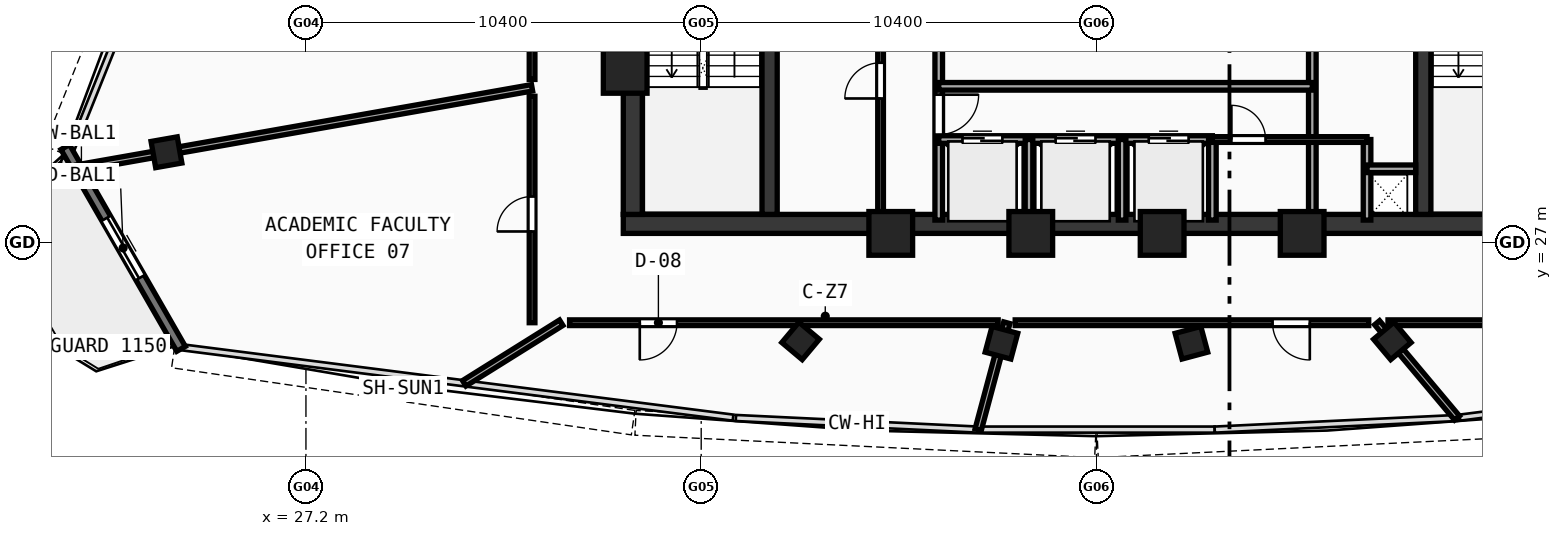
"""IFC4 building model, lengths in metres.
Left out: names, types, materials, properties, quantities, classifications, styles, units other than length and angle.
Written with IfcOpenShell. Run it as: python <this file> out.ifc"""

import sys

from ifc_helpers import new_model, si_unit, direction, frame, frame_2d, origin, origin_with_axes, origin_2d, place, context, subcontext, project, spatial, rectangle, hollow_rectangle, extrude, source, transform, mapped, element, fill, save


model = new_model("IFC4")
c1 = context("Model", 3, precision=1e-05, world=origin(), true_north=direction((0.0, 1.0)))
c2 = subcontext(c1, "Body", "Model", "MODEL_VIEW")
j1 = project(units=[si_unit("LENGTHUNIT", "METRE"), si_unit("PLANEANGLEUNIT", "RADIAN")], contexts=[c1])
p1 = place(None, origin())
s1 = spatial("IfcSite", under=j1, at=p1, CompositionType="ELEMENT")
p2 = place(p1, origin())
s2 = spatial("IfcBuilding", under=s1, at=p2, CompositionType="ELEMENT")
p3 = place(p2, frame((0.0, 0.0, 348.01)))
s3 = spatial("IfcBuildingStorey", under=s2, at=p3, CompositionType="ELEMENT", Elevation=348.01)
p4 = place(p3, frame((35.55, 27.5, 0.0), z_axis=(0.0, 0.0, 1.0), x_axis=(1.0, 0.0, 0.0)))
e1 = element("IfcWall", 1, at=p4, inside=s3, PredefinedType="SHEAR", context=c2, shape_type="SweptSolid", body=[
    extrude(rectangle(XDim=24.9, YDim=0.5, at=frame_2d((12.45, 0.0))), origin(), (0.0, 0.0, 1.0), 3.49),
])
p5 = place(p3, frame((35.8, 27.75, 0.0), z_axis=(0.0, 0.0, 1.0), x_axis=(0.0, 1.0, 0.0)))
e2 = element("IfcWall", 2, at=p5, inside=s3, PredefinedType="SHEAR", context=c2, shape_type="SweptSolid", body=[
    extrude(rectangle(XDim=12.2, YDim=0.5, at=frame_2d((6.1, 0.0))), origin(), (0.0, 0.0, 1.0), 3.49),
])
p6 = place(p3, frame((39.4, 27.75, 0.0), z_axis=(0.0, 0.0, 1.0), x_axis=(0.0, 1.0, 0.0)))
e3 = element("IfcWall", 3, at=p6, inside=s3, PredefinedType="SHEAR", context=c2, shape_type="SweptSolid", body=[
    extrude(rectangle(XDim=12.2, YDim=0.4, at=frame_2d((6.1, 0.0))), origin(), (0.0, 0.0, 1.0), 3.49),
])
p7 = place(p6, frame((10.0, 0.0, 0.0)))
e4 = element("IfcOpeningElement", 4, at=p7, cuts=e3, PredefinedType="OPENING", context=c2, shape_type="SweptSolid", body=[
    extrude(rectangle(XDim=1.1, YDim=2.1, at=frame_2d((0.55, 1.05))), frame((0.0, 0.21, 0.0), z_axis=(0.0, -1.0, 0.0), x_axis=(1.0, 0.0, 0.0)), (0.0, 0.0, 1.0), 0.42),
])
p8 = place(p3, frame((56.6, 27.75, 0.0), z_axis=(0.0, 0.0, 1.0), x_axis=(0.0, 1.0, 0.0)))
e5 = element("IfcWall", 5, at=p8, inside=s3, PredefinedType="SHEAR", context=c2, shape_type="SweptSolid", body=[
    extrude(rectangle(XDim=12.2, YDim=0.4, at=frame_2d((6.1, 0.0))), origin(), (0.0, 0.0, 1.0), 3.49),
])
p9 = place(p8, frame((10.0, 0.0, 0.0)))
e6 = element("IfcOpeningElement", 6, at=p9, cuts=e5, PredefinedType="OPENING", context=c2, shape_type="SweptSolid", body=[
    extrude(rectangle(XDim=1.1, YDim=2.1, at=frame_2d((0.55, 1.05))), frame((0.0, 0.21, 0.0), z_axis=(0.0, -1.0, 0.0), x_axis=(1.0, 0.0, 0.0)), (0.0, 0.0, 1.0), 0.42),
])
m1 = source(origin(), c2, "Body", "SweptSolid", [
    extrude(hollow_rectangle(XDim=1.15, YDim=1.15, WallThickness=0.048, at=origin_2d()), origin(), (0.0, 0.0, 1.0), 3.75),
])
for number, where, z_axis, x_axis in (
    (7, (42.588, 27.25, -0.26), (0.0, 0.0, 1.0), (1.0, 0.0, 0.0)),
    (8, (46.272, 27.25, -0.26), (0.0, 0.0, 1.0), (1.0, 0.0, 0.0)),
    (9, (49.729, 27.25, -0.26), (0.0, 0.0, 1.0), (1.0, 0.0, 0.0)),
    (10, (53.412, 27.25, -0.26), (0.0, 0.0, 1.0), (1.0, 0.0, 0.0)),
    (11, (35.6, 31.513, -0.26), (0.0, 0.0, 1.0), (1.0, 0.0, 0.0)),
):
    element("IfcColumn", number, at=place(p3, frame(where, z_axis=z_axis, x_axis=x_axis)), inside=s3, PredefinedType="COLUMN", context=c2, shape_type="MappedRepresentation", body=[
        mapped(m1, transform((0.0, 0.0, 0.0), scale=1.0)),
    ])
m2 = source(origin(), c2, "Body", "SweptSolid", [
    extrude(hollow_rectangle(XDim=0.7, YDim=0.7, WallThickness=0.026, at=origin_2d()), origin(), (0.0, 0.0, 1.0), 3.75),
])
for number, where, z_axis, x_axis in (
    (12, (40.215, 24.422, -0.26), (0.0, 0.0, 1.0), (0.766, -0.643, 0.0)),
    (13, (45.501, 24.373, -0.26), (0.0, 0.0, 1.0), (0.966, -0.259, 0.0)),
    (14, (50.499, 24.373, -0.26), (0.0, 0.0, 1.0), (0.966, 0.259, 0.0)),
    (15, (55.785, 24.422, -0.26), (0.0, 0.0, 1.0), (0.766, 0.643, 0.0)),
    (16, (23.53, 29.385, -0.26), (0.0, 0.0, 1.0), (0.174, -0.985, 0.0)),
):
    element("IfcColumn", number, at=place(p3, frame(where, z_axis=z_axis, x_axis=x_axis)), inside=s3, PredefinedType="COLUMN", context=c2, shape_type="MappedRepresentation", body=[
        mapped(m2, transform((0.0, 0.0, 0.0), scale=1.0)),
    ])
p10 = place(p3, frame((20.865, 29.521, 0.0), z_axis=(0.0, 0.0, 1.0), x_axis=(0.49795859982, -0.867200803082, 0.0)))
e17 = element("IfcWall", 17, at=p10, inside=s3, PredefinedType="STANDARD", context=c2, shape_type="SweptSolid", body=[
    extrude(rectangle(XDim=6.123, YDim=0.26, at=frame_2d((3.061, 0.0))), origin(), (0.0, 0.0, 1.0), 3.49),
])
p11 = place(p10, frame((2.161, 0.0, 0.0)))
e18 = element("IfcOpeningElement", 18, at=p11, cuts=e17, PredefinedType="OPENING", context=c2, shape_type="SweptSolid", body=[
    extrude(rectangle(XDim=1.8, YDim=2.15, at=frame_2d((0.9, 1.075))), frame((0.0, 0.14, 0.0), z_axis=(0.0, -1.0, 0.0), x_axis=(1.0, 0.0, 0.0)), (0.0, 0.0, 1.0), 0.28),
])
p12 = place(p3, frame((43.85, 27.6, 0.0), z_axis=(0.0, 0.0, 1.0), x_axis=(0.0, 1.0, 0.0)))
e19 = element("IfcWall", 19, at=p12, inside=s3, PredefinedType="SOLIDWALL", context=c2, shape_type="SweptSolid", body=[
    extrude(rectangle(XDim=6.22, YDim=0.2, at=frame_2d((3.11, 0.0))), origin(), (0.0, 0.0, 1.0), 3.49),
])
p13 = place(p12, frame((2.25, 0.0, 0.0)))
e20 = element("IfcOpeningElement", 20, at=p13, cuts=e19, PredefinedType="OPENING", context=c2, shape_type="SweptSolid", body=[
    extrude(rectangle(XDim=1.05, YDim=2.1, at=frame_2d((0.525, 1.05))), frame((0.0, 0.11, 0.0), z_axis=(0.0, -1.0, 0.0), x_axis=(1.0, 0.0, 0.0)), (0.0, 0.0, 1.0), 0.22),
])
p14 = place(p3, frame((53.68, 27.6, 0.0), z_axis=(0.0, 0.0, 1.0), x_axis=(0.0, 1.0, 0.0)))
e21 = element("IfcWall", 21, at=p14, inside=s3, PredefinedType="SOLIDWALL", context=c2, shape_type="SweptSolid", body=[
    extrude(rectangle(XDim=9.05, YDim=0.2, at=frame_2d((4.525, 0.0))), origin(), (0.0, 0.0, 1.0), 3.49),
])
p15 = place(p14, frame((6.9, 0.0, 0.0)))
e22 = element("IfcOpeningElement", 22, at=p15, cuts=e21, PredefinedType="OPENING", context=c2, shape_type="SweptSolid", body=[
    extrude(rectangle(XDim=1.05, YDim=2.1, at=frame_2d((0.525, 1.05))), frame((0.0, 0.11, 0.0), z_axis=(0.0, -1.0, 0.0), x_axis=(1.0, 0.0, 0.0)), (0.0, 0.0, 1.0), 0.22),
])
p16 = place(p3, frame((43.85, 29.72, 0.0), z_axis=(0.0, 0.0, 1.0), x_axis=(1.0, 0.0, 0.0)))
e23 = element("IfcWall", 23, at=p16, inside=s3, PredefinedType="SOLIDWALL", context=c2, shape_type="SweptSolid", body=[
    extrude(rectangle(XDim=7.2, YDim=0.2, at=frame_2d((3.6, 0.0))), origin(), (0.0, 0.0, 1.0), 3.49),
])
p17 = place(p16, frame((0.625, 0.0, 0.0)))
e24 = element("IfcOpeningElement", 24, at=p17, cuts=e23, PredefinedType="OPENING", context=c2, shape_type="SweptSolid", body=[
    extrude(rectangle(XDim=1.05, YDim=2.1, at=frame_2d((0.525, 1.05))), frame((0.0, 0.11, 0.0), z_axis=(0.0, -1.0, 0.0), x_axis=(1.0, 0.0, 0.0)), (0.0, 0.0, 1.0), 0.22),
])
p18 = place(p16, frame((3.075, 0.0, 0.0)))
e25 = element("IfcOpeningElement", 25, at=p18, cuts=e23, PredefinedType="OPENING", context=c2, shape_type="SweptSolid", body=[
    extrude(rectangle(XDim=1.05, YDim=2.1, at=frame_2d((0.525, 1.05))), frame((0.0, 0.11, 0.0), z_axis=(0.0, -1.0, 0.0), x_axis=(1.0, 0.0, 0.0)), (0.0, 0.0, 1.0), 0.22),
])
p19 = place(p16, frame((5.525, 0.0, 0.0)))
e26 = element("IfcOpeningElement", 26, at=p19, cuts=e23, PredefinedType="OPENING", context=c2, shape_type="SweptSolid", body=[
    extrude(rectangle(XDim=1.05, YDim=2.1, at=frame_2d((0.525, 1.05))), frame((0.0, 0.11, 0.0), z_axis=(0.0, -1.0, 0.0), x_axis=(1.0, 0.0, 0.0)), (0.0, 0.0, 1.0), 0.22),
])
p20 = place(p3, frame((51.05, 27.6, 0.0), z_axis=(0.0, 0.0, 1.0), x_axis=(0.0, 1.0, 0.0)))
e27 = element("IfcWall", 27, at=p20, inside=s3, PredefinedType="SOLIDWALL", context=c2, shape_type="SweptSolid", body=[
    extrude(rectangle(XDim=2.12, YDim=0.2, at=frame_2d((1.06, 0.0))), origin(), (0.0, 0.0, 1.0), 3.49),
])
p21 = place(p3, frame((43.85, 31.12, 0.0), z_axis=(0.0, 0.0, 1.0), x_axis=(1.0, 0.0, 0.0)))
e28 = element("IfcWall", 28, at=p21, inside=s3, PredefinedType="SOLIDWALL", context=c2, shape_type="SweptSolid", body=[
    extrude(rectangle(XDim=9.83, YDim=0.2, at=frame_2d((4.915, 0.0))), origin(), (0.0, 0.0, 1.0), 3.49),
])
for number, where, z_axis, x_axis in (
    (29, (46.225, 27.6, 0.0), (0.0, 0.0, 1.0), (0.0, 1.0, 0.0)),
    (30, (48.675, 27.6, 0.0), (0.0, 0.0, 1.0), (0.0, 1.0, 0.0)),
    (31, (55.12, 27.6, 0.0), (0.0, 0.0, 1.0), (0.0, 1.0, 0.0)),
):
    element("IfcWall", number, at=place(p3, frame(where, z_axis=z_axis, x_axis=x_axis)), inside=s3, PredefinedType="SOLIDWALL", context=c2, shape_type="SweptSolid", body=[
        extrude(rectangle(XDim=2.12, YDim=0.2, at=frame_2d((1.06, 0.0))), origin(), (0.0, 0.0, 1.0), 3.49),
    ])
p22 = place(p3, frame((55.12, 28.95, 0.0), z_axis=(0.0, 0.0, 1.0), x_axis=(1.0, 0.0, 0.0)))
e32 = element("IfcWall", 32, at=p22, inside=s3, PredefinedType="SOLIDWALL", context=c2, shape_type="SweptSolid", body=[
    extrude(rectangle(XDim=1.28, YDim=0.2, at=frame_2d((0.64, 0.0))), origin(), (0.0, 0.0, 1.0), 3.49),
])
p23 = place(p3, frame((42.32, 27.6, 0.0), z_axis=(0.0, 0.0, 1.0), x_axis=(0.0, 1.0, 0.0)))
e33 = element("IfcWall", 33, at=p23, inside=s3, PredefinedType="PARTITIONING", context=c2, shape_type="SweptSolid", body=[
    extrude(rectangle(XDim=5.9, YDim=0.15, at=frame_2d((2.95, 0.0))), origin(), (0.0, 0.0, 1.0), 3.49),
])
p24 = place(p23, frame((3.2, 0.0, 0.0)))
e34 = element("IfcOpeningElement", 34, at=p24, cuts=e33, PredefinedType="OPENING", context=c2, shape_type="SweptSolid", body=[
    extrude(rectangle(XDim=0.94, YDim=2.1, at=frame_2d((0.47, 1.05))), frame((0.0, 0.085, 0.0), z_axis=(0.0, -1.0, 0.0), x_axis=(1.0, 0.0, 0.0)), (0.0, 0.0, 1.0), 0.17),
])
p25 = place(p3, frame((51.05, 29.72, 0.0), z_axis=(0.0, 0.0, 1.0), x_axis=(1.0, 0.0, 0.0)))
e35 = element("IfcWall", 35, at=p25, inside=s3, PredefinedType="PARTITIONING", context=c2, shape_type="SweptSolid", body=[
    extrude(rectangle(XDim=4.07, YDim=0.15, at=frame_2d((2.035, 0.0))), origin(), (0.0, 0.0, 1.0), 3.49),
])
p26 = place(p25, frame((0.5, 0.0, 0.0)))
e36 = element("IfcOpeningElement", 36, at=p26, cuts=e35, PredefinedType="OPENING", context=c2, shape_type="SweptSolid", body=[
    extrude(rectangle(XDim=0.9, YDim=2.1, at=frame_2d((0.45, 1.05))), frame((0.0, 0.085, 0.0), z_axis=(0.0, -1.0, 0.0), x_axis=(1.0, 0.0, 0.0)), (0.0, 0.0, 1.0), 0.17),
])
p27 = place(p3, frame((33.15, 31.082, 0.0), z_axis=(0.0, 0.0, 1.0), x_axis=(-0.984808019511, -0.173646666272, 0.0)))
e37 = element("IfcWall", 37, at=p27, inside=s3, PredefinedType="PARTITIONING", context=c2, shape_type="SweptSolid", body=[
    extrude(rectangle(XDim=12.153, YDim=0.17, at=frame_2d((6.077, 0.0))), origin(), (0.0, 0.0, 1.0), 2.89),
])
p28 = place(p3, frame((33.917, 24.9, 0.0), z_axis=(0.0, 0.0, 1.0), x_axis=(-0.848039321644, -0.52993330613, 0.0)))
e38 = element("IfcWall", 38, at=p28, inside=s3, PredefinedType="PARTITIONING", context=c2, shape_type="SweptSolid", body=[
    extrude(rectangle(XDim=3.009, YDim=0.17, at=frame_2d((1.505, 0.0))), origin(), (0.0, 0.0, 1.0), 3.49),
])
p29 = place(p3, frame((45.642, 24.9, 0.0), z_axis=(0.0, 0.0, 1.0), x_axis=(-0.258857635458, -0.965915485208, 0.0)))
e39 = element("IfcWall", 39, at=p29, inside=s3, PredefinedType="PARTITIONING", context=c2, shape_type="SweptSolid", body=[
    extrude(rectangle(XDim=2.911, YDim=0.17, at=frame_2d((1.456, 0.0))), origin(), (0.0, 0.0, 1.0), 2.89),
])
p30 = place(p3, frame((55.384, 24.9, 0.0), z_axis=(0.0, 0.0, 1.0), x_axis=(0.642829818613, -0.766009023642, 0.0)))
e40 = element("IfcWall", 40, at=p30, inside=s3, PredefinedType="PARTITIONING", context=c2, shape_type="SweptSolid", body=[
    extrude(rectangle(XDim=3.272, YDim=0.17, at=frame_2d((1.636, 0.0))), origin(), (0.0, 0.0, 1.0), 2.89),
])
p31 = place(p3, frame((33.15, 24.9, 0.0), z_axis=(0.0, 0.0, 1.0), x_axis=(0.0, 1.0, 0.0)))
e41 = element("IfcWall", 41, at=p31, inside=s3, PredefinedType="PARTITIONING", context=c2, shape_type="SweptSolid", body=[
    extrude(rectangle(XDim=5.958, YDim=0.15, at=frame_2d((2.979, 0.0))), origin(), (0.0, 0.0, 1.0), 2.89),
])
p32 = place(p31, frame((2.401, 0.0, 0.0)))
e42 = element("IfcOpeningElement", 42, at=p32, cuts=e41, PredefinedType="OPENING", context=c2, shape_type="SweptSolid", body=[
    extrude(rectangle(XDim=0.92, YDim=2.1, at=frame_2d((0.46, 1.05))), frame((0.0, 0.085, 0.0), z_axis=(0.0, -1.0, 0.0), x_axis=(1.0, 0.0, 0.0)), (0.0, 0.0, 1.0), 0.17),
])
p33 = place(p3, frame((33.15, 31.301, 0.0), z_axis=(0.0, 0.0, 1.0), x_axis=(0.0, 1.0, 0.0)))
e43 = element("IfcWall", 43, at=p33, inside=s3, PredefinedType="PARTITIONING", context=c2, shape_type="SweptSolid", body=[
    extrude(rectangle(XDim=10.899, YDim=0.15, at=frame_2d((5.449, 0.0))), origin(), (0.0, 0.0, 1.0), 2.89),
])
p34 = place(p33, frame((5.094, 0.0, 0.0)))
e44 = element("IfcOpeningElement", 44, at=p34, cuts=e43, PredefinedType="OPENING", context=c2, shape_type="SweptSolid", body=[
    extrude(rectangle(XDim=0.98, YDim=2.12, at=frame_2d((0.49, 1.06))), frame((0.0, 0.085, 0.0), z_axis=(0.0, -1.0, 0.0), x_axis=(1.0, 0.0, 0.0)), (0.0, 0.0, 1.0), 0.17),
])
p35 = place(p3, frame((62.85, 24.9, 0.0), z_axis=(0.0, 0.0, 1.0), x_axis=(-1.0, 0.0, 0.0)))
e45 = element("IfcWall", 45, at=p35, inside=s3, PredefinedType="PARTITIONING", context=c2, shape_type="SweptSolid", body=[
    extrude(rectangle(XDim=7.179, YDim=0.15, at=frame_2d((3.589, 0.0))), origin(), (0.0, 0.0, 1.0), 2.89),
])
p36 = place(p35, frame((2.25, 0.0, 0.0)))
e46 = element("IfcOpeningElement", 46, at=p36, cuts=e45, PredefinedType="OPENING", context=c2, shape_type="SweptSolid", body=[
    extrude(rectangle(XDim=0.98, YDim=2.12, at=frame_2d((0.49, 1.06))), frame((0.0, 0.085, 0.0), z_axis=(0.0, -1.0, 0.0), x_axis=(1.0, 0.0, 0.0)), (0.0, 0.0, 1.0), 0.17),
])
p37 = place(p3, frame((55.164, 24.9, 0.0), z_axis=(0.0, 0.0, 1.0), x_axis=(-1.0, 0.0, 0.0)))
e47 = element("IfcWall", 47, at=p37, inside=s3, PredefinedType="PARTITIONING", context=c2, shape_type="SweptSolid", body=[
    extrude(rectangle(XDim=9.302, YDim=0.15, at=frame_2d((4.651, 0.0))), origin(), (0.0, 0.0, 1.0), 2.89),
])
p38 = place(p37, frame((1.55, 0.0, 0.0)))
e48 = element("IfcOpeningElement", 48, at=p38, cuts=e47, PredefinedType="OPENING", context=c2, shape_type="SweptSolid", body=[
    extrude(rectangle(XDim=0.98, YDim=2.12, at=frame_2d((0.49, 1.06))), frame((0.0, 0.085, 0.0), z_axis=(0.0, -1.0, 0.0), x_axis=(1.0, 0.0, 0.0)), (0.0, 0.0, 1.0), 0.17),
])
p39 = place(p3, frame((45.414, 24.9, 0.0), z_axis=(0.0, 0.0, 1.0), x_axis=(-1.0, 0.0, 0.0)))
e49 = element("IfcWall", 49, at=p39, inside=s3, PredefinedType="PARTITIONING", context=c2, shape_type="SweptSolid", body=[
    extrude(rectangle(XDim=11.277, YDim=0.15, at=frame_2d((5.639, 0.0))), origin(), (0.0, 0.0, 1.0), 2.89),
])
p40 = place(p39, frame((8.45, 0.0, 0.0)))
e50 = element("IfcOpeningElement", 50, at=p40, cuts=e49, PredefinedType="OPENING", context=c2, shape_type="SweptSolid", body=[
    extrude(rectangle(XDim=0.98, YDim=2.12, at=frame_2d((0.49, 1.06))), frame((0.0, 0.085, 0.0), z_axis=(0.0, -1.0, 0.0), x_axis=(1.0, 0.0, 0.0)), (0.0, 0.0, 1.0), 0.17),
])
m3 = source(origin(), c2, "Body", "SweptSolid", [
    extrude(rectangle(XDim=1.8, YDim=2.15, at=frame_2d((0.9, 1.075))), frame((0.0, 0.025, 0.0), z_axis=(0.0, -1.0, 0.0), x_axis=(1.0, 0.0, 0.0)), (0.0, 0.0, 1.0), 0.05),
])
p41 = place(p11, origin_with_axes())
e51 = element("IfcDoor", 51, at=p41, inside=s3, OperationType="DOUBLE_DOOR_SLIDING", PredefinedType="DOOR", context=c2, shape_type="MappedRepresentation", body=[
    mapped(m3, transform((0.0, 0.0, 0.0), scale=1.0)),
])
fill(e18, e51)
m4 = source(origin(), c2, "Body", "SweptSolid", [
    extrude(rectangle(XDim=1.05, YDim=2.1, at=frame_2d((0.525, 1.05))), frame((0.0, 0.025, 0.0), z_axis=(0.0, -1.0, 0.0), x_axis=(1.0, 0.0, 0.0)), (0.0, 0.0, 1.0), 0.05),
])
p42 = place(p13, frame((1.05, 0.0, 0.0), z_axis=(0.0, 0.0, 1.0), x_axis=(-1.0, 0.0, 0.0)))
e52 = element("IfcDoor", 52, at=p42, inside=s3, OperationType="SINGLE_SWING_LEFT", PredefinedType="DOOR", context=c2, shape_type="MappedRepresentation", body=[
    mapped(m4, transform((0.0, 0.0, 0.0), scale=1.0)),
])
fill(e20, e52)
p43 = place(p17, origin_with_axes())
e53 = element("IfcDoor", 53, at=p43, inside=s3, OperationType="DOUBLE_DOOR_SLIDING", PredefinedType="DOOR", context=c2, shape_type="MappedRepresentation", body=[
    mapped(m4, transform((0.0, 0.0, 0.0), scale=1.0)),
])
fill(e24, e53)
p44 = place(p18, origin_with_axes())
e54 = element("IfcDoor", 54, at=p44, inside=s3, OperationType="DOUBLE_DOOR_SLIDING", PredefinedType="DOOR", context=c2, shape_type="MappedRepresentation", body=[
    mapped(m4, transform((0.0, 0.0, 0.0), scale=1.0)),
])
fill(e25, e54)
p45 = place(p19, origin_with_axes())
e55 = element("IfcDoor", 55, at=p45, inside=s3, OperationType="DOUBLE_DOOR_SLIDING", PredefinedType="DOOR", context=c2, shape_type="MappedRepresentation", body=[
    mapped(m4, transform((0.0, 0.0, 0.0), scale=1.0)),
])
fill(e26, e55)
m5 = source(origin(), c2, "Body", "SweptSolid", [
    extrude(rectangle(XDim=0.94, YDim=2.1, at=frame_2d((0.47, 1.05))), frame((0.0, 0.025, 0.0), z_axis=(0.0, -1.0, 0.0), x_axis=(1.0, 0.0, 0.0)), (0.0, 0.0, 1.0), 0.05),
])
p46 = place(p24, origin_with_axes())
e56 = element("IfcDoor", 56, at=p46, inside=s3, OperationType="SINGLE_SWING_LEFT", PredefinedType="DOOR", context=c2, shape_type="MappedRepresentation", body=[
    mapped(m5, transform((0.0, 0.0, 0.0), scale=1.0)),
])
fill(e34, e56)
m6 = source(origin(), c2, "Body", "SweptSolid", [
    extrude(rectangle(XDim=0.9, YDim=2.1, at=frame_2d((0.45, 1.05))), frame((0.0, 0.025, 0.0), z_axis=(0.0, -1.0, 0.0), x_axis=(1.0, 0.0, 0.0)), (0.0, 0.0, 1.0), 0.05),
])
p47 = place(p26, origin_with_axes())
e57 = element("IfcDoor", 57, at=p47, inside=s3, OperationType="SINGLE_SWING_LEFT", PredefinedType="DOOR", context=c2, shape_type="MappedRepresentation", body=[
    mapped(m6, transform((0.0, 0.0, 0.0), scale=1.0)),
])
fill(e36, e57)
m7 = source(origin(), c2, "Body", "SweptSolid", [
    extrude(rectangle(XDim=0.92, YDim=2.1, at=frame_2d((0.46, 1.05))), frame((0.0, 0.025, 0.0), z_axis=(0.0, -1.0, 0.0), x_axis=(1.0, 0.0, 0.0)), (0.0, 0.0, 1.0), 0.05),
])
p48 = place(p32, origin_with_axes())
e58 = element("IfcDoor", 58, at=p48, inside=s3, OperationType="SINGLE_SWING_LEFT", PredefinedType="DOOR", context=c2, shape_type="MappedRepresentation", body=[
    mapped(m7, transform((0.0, 0.0, 0.0), scale=1.0)),
])
fill(e42, e58)
m8 = source(origin(), c2, "Body", "SweptSolid", [
    extrude(rectangle(XDim=0.98, YDim=2.12, at=frame_2d((0.49, 1.06))), frame((0.0, 0.025, 0.0), z_axis=(0.0, -1.0, 0.0), x_axis=(1.0, 0.0, 0.0)), (0.0, 0.0, 1.0), 0.05),
])
p49 = place(p40, origin_with_axes())
e59 = element("IfcDoor", 59, at=p49, inside=s3, OperationType="SINGLE_SWING_RIGHT", PredefinedType="DOOR", context=c2, shape_type="MappedRepresentation", body=[
    mapped(m8, transform((0.0, 0.0, 0.0), scale=1.0)),
])
fill(e50, e59)
p50 = place(p38, origin_with_axes())
e60 = element("IfcDoor", 60, at=p50, inside=s3, OperationType="SINGLE_SWING_LEFT", PredefinedType="DOOR", context=c2, shape_type="MappedRepresentation", body=[
    mapped(m8, transform((0.0, 0.0, 0.0), scale=1.0)),
])
fill(e48, e60)
save(model, sys.argv[1])
